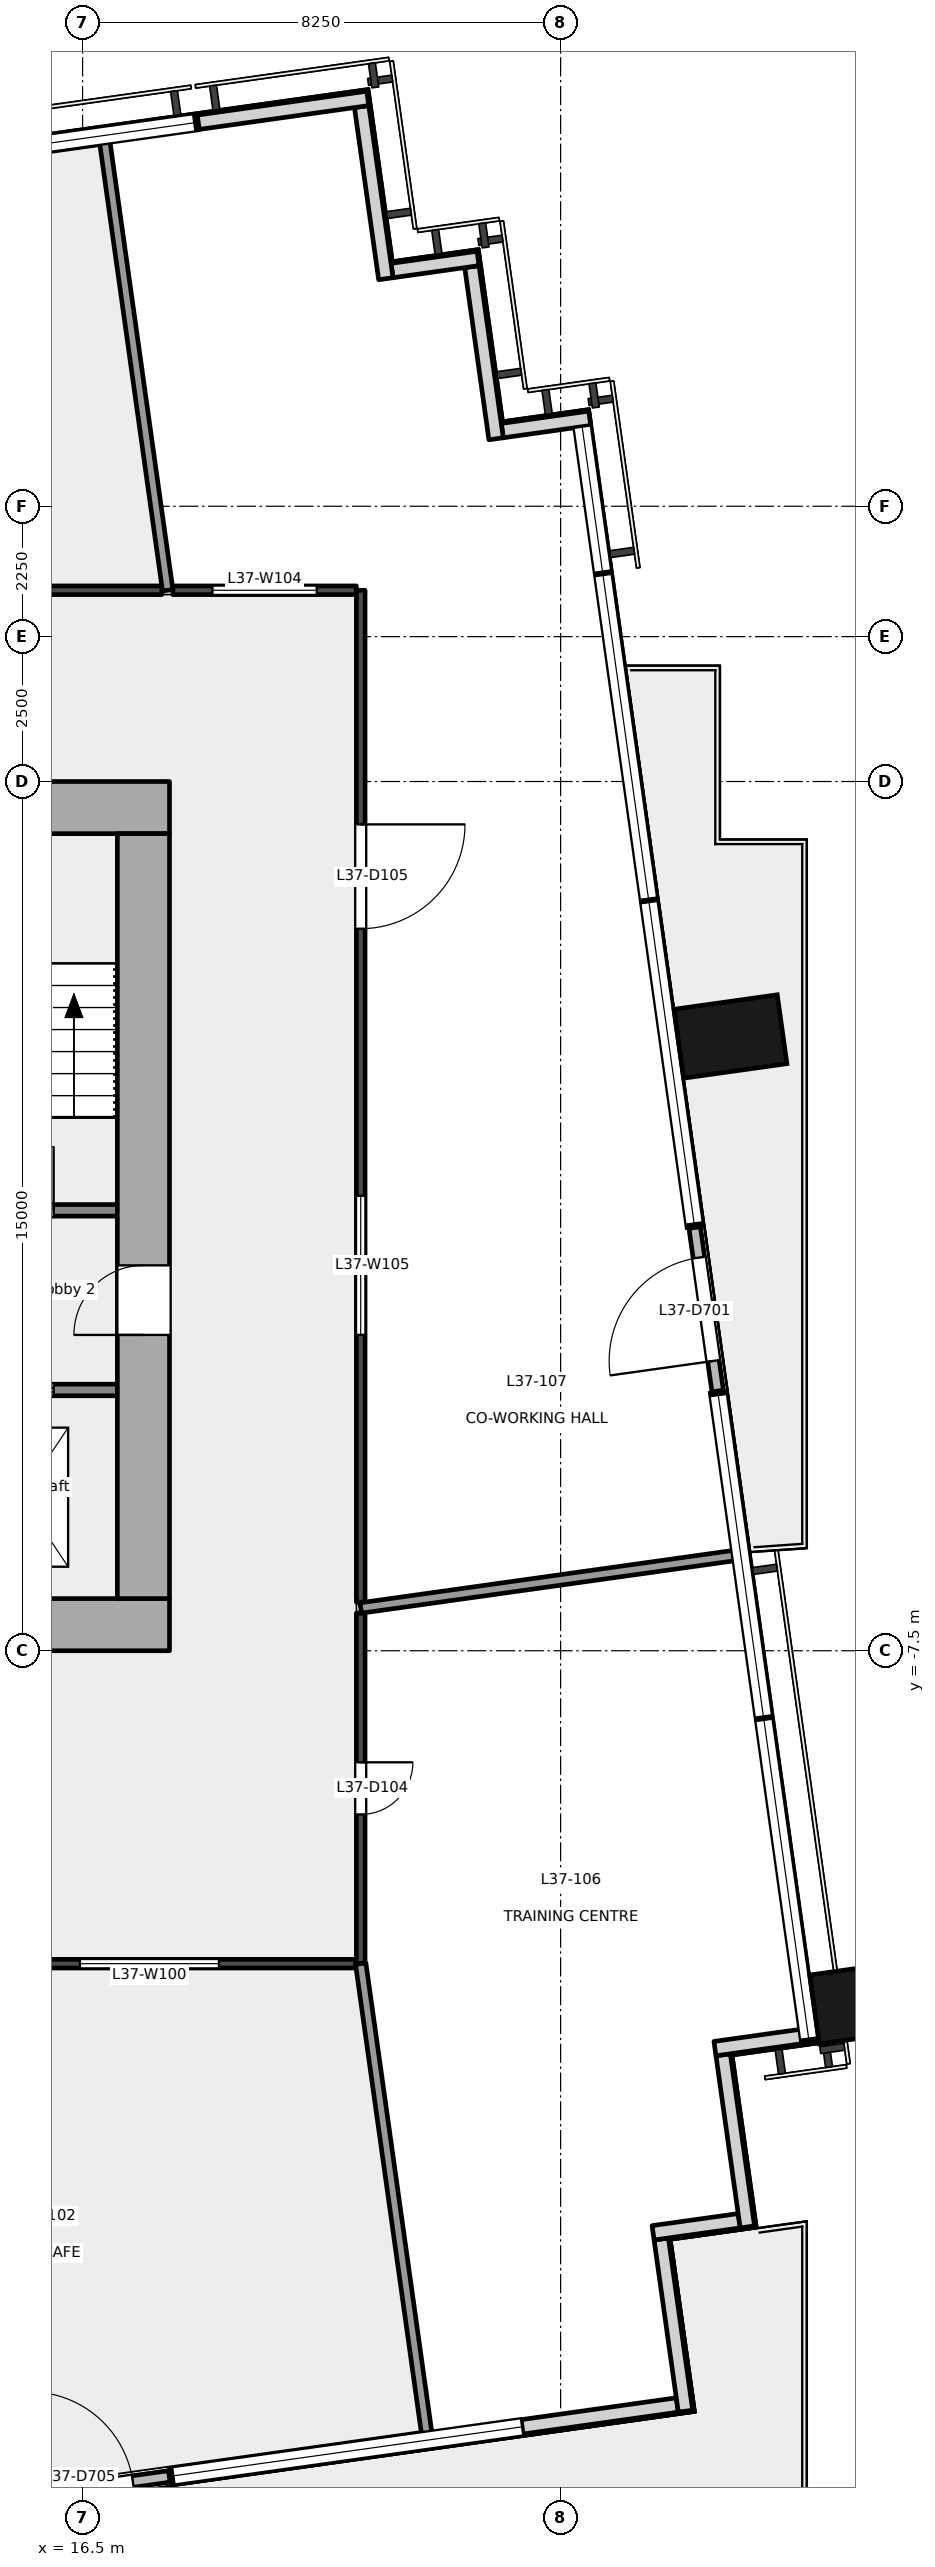
"""IFC4 building model, lengths in metres.
Left out: names, types, materials, properties, quantities, classifications, styles, units other than length and angle.
Written with IfcOpenShell. Run it as: python <this file> out.ifc"""

import sys

from ifc_helpers import new_model, si_unit, direction, frame, frame_2d, origin, origin_2d, place, context, subcontext, project, spatial, rectangle, extrude, element, fill, save


model = new_model("IFC4")
c1 = context("Model", 3, precision=1e-05, world=origin(), true_north=direction((0.0, 1.0)))
c2 = subcontext(c1, "Body", "Model", "MODEL_VIEW")
j1 = project(units=[si_unit("LENGTHUNIT", "METRE"), si_unit("PLANEANGLEUNIT", "RADIAN")], contexts=[c1])
p1 = place(None, origin())
s1 = spatial("IfcSite", under=j1, at=p1, CompositionType="ELEMENT")
p2 = place(p1, origin())
s2 = spatial("IfcBuilding", under=s1, at=p2, CompositionType="ELEMENT")
p3 = place(p2, frame((0.0, 0.0, 163.1)))
s3 = spatial("IfcBuildingStorey", under=s2, at=p3, CompositionType="ELEMENT", Elevation=163.1)
for number, where, z_axis, x_axis in (
    (1, (30.024, -13.565, -0.2), (0.0, 0.0, 1.0), (-0.139, 0.99, 0.0)),
    (2, (27.681, 3.1, -0.2), (0.0, 0.0, 1.0), (-0.139, 0.99, 0.0)),
):
    element("IfcColumn", number, at=place(p3, frame(where, z_axis=z_axis, x_axis=x_axis)), inside=s3, PredefinedType="COLUMN", context=c2, shape_type="SweptSolid", body=[
        extrude(rectangle(XDim=1.2, YDim=1.8, at=origin_2d()), origin(), (0.0, 0.0, 1.0), 5.4),
    ])
p4 = place(p3, frame((24.085, -20.893, 0.0), z_axis=(0.0, 0.0, 1.0), x_axis=(0.990255800966, 0.139260362823, 0.0)))
e3 = element("IfcWall", 3, at=p4, inside=s3, PredefinedType="SOLIDWALL", context=c2, shape_type="SweptSolid", body=[
    extrude(rectangle(XDim=2.705, YDim=0.25, at=frame_2d((1.353, 0.0))), origin(), (0.0, 0.0, 1.0), 5.2),
])
p5 = place(p3, frame((26.905, -20.622, 0.0), z_axis=(0.0, 0.0, 1.0), x_axis=(-0.139313431826, 0.990248336385, 0.0)))
e4 = element("IfcWall", 4, at=p5, inside=s3, PredefinedType="SOLIDWALL", context=c2, shape_type="SweptSolid", body=[
    extrude(rectangle(XDim=3.0, YDim=0.25, at=frame_2d((1.5, 0.0))), origin(), (0.0, 0.0, 1.0), 5.2),
])
p6 = place(p3, frame((26.346, -17.544, 0.0), z_axis=(0.0, 0.0, 1.0), x_axis=(0.990368090482, 0.13845954411, 0.0)))
e5 = element("IfcWall", 5, at=p6, inside=s3, PredefinedType="SOLIDWALL", context=c2, shape_type="SweptSolid", body=[
    extrude(rectangle(XDim=1.5, YDim=0.25, at=frame_2d((0.75, 0.0))), origin(), (0.0, 0.0, 1.0), 5.2),
])
p7 = place(p3, frame((27.973, -17.443, 0.0), z_axis=(0.0, 0.0, 1.0), x_axis=(-0.139313431826, 0.990248336385, 0.0)))
e6 = element("IfcWall", 6, at=p7, inside=s3, PredefinedType="SOLIDWALL", context=c2, shape_type="SweptSolid", body=[
    extrude(rectangle(XDim=3.0, YDim=0.25, at=frame_2d((1.5, 0.0))), origin(), (0.0, 0.0, 1.0), 5.2),
])
p8 = place(p3, frame((27.414, -14.366, 0.0), z_axis=(0.0, 0.0, 1.0), x_axis=(0.990256286673, 0.139256908998, 0.0)))
e7 = element("IfcWall", 7, at=p8, inside=s3, PredefinedType="SOLIDWALL", context=c2, shape_type="SweptSolid", body=[
    extrude(rectangle(XDim=1.801, YDim=0.25, at=frame_2d((0.9, 0.0))), origin(), (0.0, 0.0, 1.0), 5.2),
])
p9 = place(p3, frame((27.461, -3.019, 0.0), z_axis=(0.0, 0.0, 1.0), x_axis=(-0.139202330076, 0.990263960417, 0.0)))
e8 = element("IfcWall", 8, at=p9, inside=s3, PredefinedType="SOLIDWALL", context=c2, shape_type="SweptSolid", body=[
    extrude(rectangle(XDim=2.85, YDim=0.2, at=frame_2d((1.425, 0.0))), origin(), (0.0, 0.0, 1.0), 4.1),
])
p10 = place(p9, frame((0.525, 0.0, 0.0)))
e9 = element("IfcOpeningElement", 9, at=p10, cuts=e8, PredefinedType="OPENING", context=c2, shape_type="SweptSolid", body=[
    extrude(rectangle(XDim=1.8, YDim=2.4, at=frame_2d((0.9, 1.2))), frame((0.0, 0.111, 0.0), z_axis=(0.0, -1.0, 0.0), x_axis=(1.0, 0.0, 0.0)), (0.0, 0.0, 1.0), 0.221),
])
p11 = place(p3, frame((25.253, 13.768, 0.0), z_axis=(0.0, 0.0, 1.0), x_axis=(-0.990248296447, -0.139313715703, 0.0)))
e10 = element("IfcWall", 10, at=p11, inside=s3, PredefinedType="SOLIDWALL", context=c2, shape_type="SweptSolid", body=[
    extrude(rectangle(XDim=1.525, YDim=0.25, at=frame_2d((0.762, 0.0))), origin(), (0.0, 0.0, 1.0), 5.2),
])
p12 = place(p3, frame((23.637, 13.414, 0.0), z_axis=(0.0, 0.0, 1.0), x_axis=(-0.139313431826, 0.990248336385, 0.0)))
e11 = element("IfcWall", 11, at=p12, inside=s3, PredefinedType="SOLIDWALL", context=c2, shape_type="SweptSolid", body=[
    extrude(rectangle(XDim=3.0, YDim=0.25, at=frame_2d((1.5, 0.0))), origin(), (0.0, 0.0, 1.0), 5.2),
])
p13 = place(p3, frame((23.325, 16.526, 0.0), z_axis=(0.0, 0.0, 1.0), x_axis=(-0.990243596651, -0.13934711799, 0.0)))
e12 = element("IfcWall", 12, at=p13, inside=s3, PredefinedType="SOLIDWALL", context=c2, shape_type="SweptSolid", body=[
    extrude(rectangle(XDim=1.5, YDim=0.25, at=frame_2d((0.75, 0.0))), origin(), (0.0, 0.0, 1.0), 5.2),
])
p14 = place(p3, frame((21.734, 16.176, 0.0), z_axis=(0.0, 0.0, 1.0), x_axis=(-0.139313431826, 0.990248336385, 0.0)))
e13 = element("IfcWall", 13, at=p14, inside=s3, PredefinedType="SOLIDWALL", context=c2, shape_type="SweptSolid", body=[
    extrude(rectangle(XDim=3.0, YDim=0.25, at=frame_2d((1.5, 0.0))), origin(), (0.0, 0.0, 1.0), 5.2),
])
p15 = place(p3, frame((21.422, 19.288, 0.0), z_axis=(0.0, 0.0, 1.0), x_axis=(-0.990246427036, -0.139327002919, 0.0)))
e14 = element("IfcWall", 14, at=p15, inside=s3, PredefinedType="SOLIDWALL", context=c2, shape_type="SweptSolid", body=[
    extrude(rectangle(XDim=2.954, YDim=0.25, at=frame_2d((1.477, 0.0))), origin(), (0.0, 0.0, 1.0), 5.2),
])
p16 = place(p3, frame((14.956, -22.176, 0.0), z_axis=(0.0, 0.0, 1.0), x_axis=(0.990275924543, 0.139117192578, 0.0)))
e15 = element("IfcWall", 15, at=p16, inside=s3, PredefinedType="SOLIDWALL", context=c2, shape_type="SweptSolid", body=[
    extrude(rectangle(XDim=3.071, YDim=0.2, at=frame_2d((1.536, 0.0))), origin(), (0.0, 0.0, 1.0), 4.1),
])
p17 = place(p16, frame((0.635, 0.0, 0.0)))
e16 = element("IfcOpeningElement", 16, at=p17, cuts=e15, PredefinedType="OPENING", context=c2, shape_type="SweptSolid", body=[
    extrude(rectangle(XDim=1.8, YDim=2.4, at=frame_2d((0.9, 1.2))), frame((0.0, 0.111, 0.0), z_axis=(0.0, -1.0, 0.0), x_axis=(1.0, 0.0, 0.0)), (0.0, 0.0, 1.0), 0.221),
])
p18 = place(p3, frame((-18.0, -7.05, -0.2), z_axis=(0.0, 0.0, 1.0), x_axis=(1.0, 0.0, 0.0)))
e17 = element("IfcWall", 17, at=p18, inside=s3, PredefinedType="SHEAR", context=c2, shape_type="SweptSolid", body=[
    extrude(rectangle(XDim=36.0, YDim=0.9, at=frame_2d((18.0, 0.0))), origin(), (0.0, 0.0, 1.0), 5.4),
])
p19 = place(p18, frame((7.8, 0.0, 0.2)))
e18 = element("IfcOpeningElement", 18, at=p19, cuts=e17, PredefinedType="OPENING", context=c2, shape_type="SweptSolid", body=[
    extrude(rectangle(XDim=2.4, YDim=2.1, at=frame_2d((1.2, 1.05))), frame((0.0, 0.46, 0.0), z_axis=(0.0, -1.0, 0.0), x_axis=(1.0, 0.0, 0.0)), (0.0, 0.0, 1.0), 0.921),
])
p20 = place(p18, frame((16.8, 0.0, 0.2)))
e19 = element("IfcOpeningElement", 19, at=p20, cuts=e17, PredefinedType="OPENING", context=c2, shape_type="SweptSolid", body=[
    extrude(rectangle(XDim=2.4, YDim=2.1, at=frame_2d((1.2, 1.05))), frame((0.0, 0.46, 0.0), z_axis=(0.0, -1.0, 0.0), x_axis=(1.0, 0.0, 0.0)), (0.0, 0.0, 1.0), 0.921),
])
p21 = place(p18, frame((26.1, 0.0, 0.2)))
e20 = element("IfcOpeningElement", 20, at=p21, cuts=e17, PredefinedType="OPENING", context=c2, shape_type="SweptSolid", body=[
    extrude(rectangle(XDim=2.4, YDim=2.1, at=frame_2d((1.2, 1.05))), frame((0.0, 0.46, 0.0), z_axis=(0.0, -1.0, 0.0), x_axis=(1.0, 0.0, 0.0)), (0.0, 0.0, 1.0), 0.921),
])
p22 = place(p3, frame((-18.0, 7.05, -0.2), z_axis=(0.0, 0.0, 1.0), x_axis=(1.0, 0.0, 0.0)))
e21 = element("IfcWall", 21, at=p22, inside=s3, PredefinedType="SHEAR", context=c2, shape_type="SweptSolid", body=[
    extrude(rectangle(XDim=36.0, YDim=0.9, at=frame_2d((18.0, 0.0))), origin(), (0.0, 0.0, 1.0), 5.4),
])
p23 = place(p3, frame((17.55, -6.6, -0.2), z_axis=(0.0, 0.0, 1.0), x_axis=(0.0, 1.0, 0.0)))
e22 = element("IfcWall", 22, at=p23, inside=s3, PredefinedType="SHEAR", context=c2, shape_type="SweptSolid", body=[
    extrude(rectangle(XDim=13.2, YDim=0.9, at=frame_2d((6.6, 0.0))), origin(), (0.0, 0.0, 1.0), 5.4),
])
p24 = place(p23, frame((4.55, 0.0, 0.2)))
e23 = element("IfcOpeningElement", 23, at=p24, cuts=e22, PredefinedType="OPENING", context=c2, shape_type="SweptSolid", body=[
    extrude(rectangle(XDim=1.2, YDim=2.1, at=frame_2d((0.6, 1.05))), frame((0.0, 0.46, 0.0), z_axis=(0.0, -1.0, 0.0), x_axis=(1.0, 0.0, 0.0)), (0.0, 0.0, 1.0), 0.921),
])
p25 = place(p3, frame((13.8, -3.0, 0.0), z_axis=(0.0, 0.0, 1.0), x_axis=(1.0, 0.0, 0.0)))
e24 = element("IfcWall", 24, at=p25, inside=s3, PredefinedType="PARTITIONING", context=c2, shape_type="SweptSolid", body=[
    extrude(rectangle(XDim=3.3, YDim=0.2, at=frame_2d((1.65, 0.0))), origin(), (0.0, 0.0, 1.0), 5.2),
])
p26 = place(p25, frame((1.1, 0.0, 0.0)))
e25 = element("IfcOpeningElement", 25, at=p26, cuts=e24, PredefinedType="OPENING", context=c2, shape_type="SweptSolid", body=[
    extrude(rectangle(XDim=1.1, YDim=2.1, at=frame_2d((0.55, 1.05))), frame((0.0, 0.111, 0.0), z_axis=(0.0, -1.0, 0.0), x_axis=(1.0, 0.0, 0.0)), (0.0, 0.0, 1.0), 0.221),
])
p27 = place(p3, frame((13.8, 0.1, 0.0), z_axis=(0.0, 0.0, 1.0), x_axis=(1.0, 0.0, 0.0)))
e26 = element("IfcWall", 26, at=p27, inside=s3, PredefinedType="PARTITIONING", context=c2, shape_type="SweptSolid", body=[
    extrude(rectangle(XDim=3.3, YDim=0.2, at=frame_2d((1.65, 0.0))), origin(), (0.0, 0.0, 1.0), 5.2),
])
p28 = place(p27, frame((1.1, 0.0, 0.0)))
e27 = element("IfcOpeningElement", 27, at=p28, cuts=e26, PredefinedType="OPENING", context=c2, shape_type="SweptSolid", body=[
    extrude(rectangle(XDim=1.1, YDim=2.1, at=frame_2d((0.55, 1.05))), frame((0.0, 0.111, 0.0), z_axis=(0.0, -1.0, 0.0), x_axis=(1.0, 0.0, 0.0)), (0.0, 0.0, 1.0), 0.221),
])
p29 = place(p3, frame((21.211, -12.9, 0.0), z_axis=(0.0, 0.0, 1.0), x_axis=(-1.0, 0.0, 0.0)))
e28 = element("IfcWall", 28, at=p29, inside=s3, PredefinedType="PARTITIONING", context=c2, shape_type="SweptSolid", body=[
    extrude(rectangle(XDim=10.555, YDim=0.15, at=frame_2d((5.277, 0.0))), origin(), (0.0, 0.0, 1.0), 4.6),
])
p30 = place(p29, frame((7.116, 0.0, 0.0)))
e29 = element("IfcOpeningElement", 29, at=p30, cuts=e28, PredefinedType="OPENING", context=c2, shape_type="SweptSolid", body=[
    extrude(rectangle(XDim=0.9, YDim=2.1, at=frame_2d((0.45, 1.05))), frame((0.0, 0.085, 0.0), z_axis=(0.0, -1.0, 0.0), x_axis=(1.0, 0.0, 0.0)), (0.0, 0.0, 1.0), 0.171),
])
p31 = place(p29, frame((2.358, 0.0, 0.0)))
e30 = element("IfcOpeningElement", 30, at=p31, cuts=e28, PredefinedType="OPENING", context=c2, shape_type="SweptSolid", body=[
    extrude(rectangle(XDim=2.4, YDim=2.4, at=frame_2d((1.2, 1.2))), frame((0.0, 0.085, 0.0), z_axis=(0.0, -1.0, 0.0), x_axis=(1.0, 0.0, 0.0)), (0.0, 0.0, 1.0), 0.171),
])
p32 = place(p3, frame((7.246, 10.8, 0.0), z_axis=(0.0, 0.0, 1.0), x_axis=(1.0, 0.0, 0.0)))
e31 = element("IfcWall", 31, at=p32, inside=s3, PredefinedType="PARTITIONING", context=c2, shape_type="SweptSolid", body=[
    extrude(rectangle(XDim=10.622, YDim=0.15, at=frame_2d((5.311, 0.0))), origin(), (0.0, 0.0, 1.0), 4.7),
])
p33 = place(p32, frame((7.166, 0.0, 0.0)))
e32 = element("IfcOpeningElement", 32, at=p33, cuts=e31, PredefinedType="OPENING", context=c2, shape_type="SweptSolid", body=[
    extrude(rectangle(XDim=0.9, YDim=2.1, at=frame_2d((0.45, 1.05))), frame((0.0, 0.085, 0.0), z_axis=(0.0, -1.0, 0.0), x_axis=(1.0, 0.0, 0.0)), (0.0, 0.0, 1.0), 0.171),
])
p34 = place(p32, frame((2.383, 0.0, 0.0)))
e33 = element("IfcOpeningElement", 33, at=p34, cuts=e31, PredefinedType="OPENING", context=c2, shape_type="SweptSolid", body=[
    extrude(rectangle(XDim=2.4, YDim=2.4, at=frame_2d((1.2, 1.2))), frame((0.0, 0.085, 0.0), z_axis=(0.0, -1.0, 0.0), x_axis=(1.0, 0.0, 0.0)), (0.0, 0.0, 1.0), 0.171),
])
p35 = place(p3, frame((21.3, -6.851, 0.0), z_axis=(0.0, 0.0, 1.0), x_axis=(0.0, -1.0, 0.0)))
e34 = element("IfcWall", 34, at=p35, inside=s3, PredefinedType="PARTITIONING", context=c2, shape_type="SweptSolid", body=[
    extrude(rectangle(XDim=6.049, YDim=0.15, at=frame_2d((3.024, 0.0))), origin(), (0.0, 0.0, 1.0), 5.2),
])
p36 = place(p35, frame((2.574, 0.0, 0.0)))
e35 = element("IfcOpeningElement", 35, at=p36, cuts=e34, PredefinedType="OPENING", context=c2, shape_type="SweptSolid", body=[
    extrude(rectangle(XDim=0.9, YDim=2.1, at=frame_2d((0.45, 1.05))), frame((0.0, 0.085, 0.0), z_axis=(0.0, -1.0, 0.0), x_axis=(1.0, 0.0, 0.0)), (0.0, 0.0, 1.0), 0.171),
])
p37 = place(p3, frame((18.058, 10.8, 0.0), z_axis=(0.0, 0.0, 1.0), x_axis=(1.0, 0.0, 0.0)))
e36 = element("IfcWall", 36, at=p37, inside=s3, PredefinedType="PARTITIONING", context=c2, shape_type="SweptSolid", body=[
    extrude(rectangle(XDim=3.167, YDim=0.15, at=frame_2d((1.583, 0.0))), origin(), (0.0, 0.0, 1.0), 5.2),
])
p38 = place(p37, frame((0.683, 0.0, 0.0)))
e37 = element("IfcOpeningElement", 37, at=p38, cuts=e36, PredefinedType="OPENING", context=c2, shape_type="SweptSolid", body=[
    extrude(rectangle(XDim=1.8, YDim=2.4, at=frame_2d((0.9, 1.2))), frame((0.0, 0.085, 0.0), z_axis=(0.0, -1.0, 0.0), x_axis=(1.0, 0.0, 0.0)), (0.0, 0.0, 1.0), 0.171),
])
p39 = place(p3, frame((21.3, 10.8, 0.0), z_axis=(0.0, 0.0, 1.0), x_axis=(0.0, -1.0, 0.0)))
e38 = element("IfcWall", 38, at=p39, inside=s3, PredefinedType="PARTITIONING", context=c2, shape_type="SweptSolid", body=[
    extrude(rectangle(XDim=17.461, YDim=0.15, at=frame_2d((8.73, 0.0))), origin(), (0.0, 0.0, 1.0), 4.75),
])
p40 = place(p39, frame((4.04, 0.0, 0.0)))
e39 = element("IfcOpeningElement", 39, at=p40, cuts=e38, PredefinedType="OPENING", context=c2, shape_type="SweptSolid", body=[
    extrude(rectangle(XDim=1.8, YDim=2.1, at=frame_2d((0.9, 1.05))), frame((0.0, 0.085, 0.0), z_axis=(0.0, -1.0, 0.0), x_axis=(1.0, 0.0, 0.0)), (0.0, 0.0, 1.0), 0.171),
])
p41 = place(p39, frame((10.449, 0.0, 0.0)))
e40 = element("IfcOpeningElement", 40, at=p41, cuts=e38, PredefinedType="OPENING", context=c2, shape_type="SweptSolid", body=[
    extrude(rectangle(XDim=2.4, YDim=2.4, at=frame_2d((1.2, 1.2))), frame((0.0, 0.085, 0.0), z_axis=(0.0, -1.0, 0.0), x_axis=(1.0, 0.0, 0.0)), (0.0, 0.0, 1.0), 0.171),
])
p42 = place(p3, frame((21.3, -12.9, 0.0), z_axis=(0.0, 0.0, 1.0), x_axis=(0.13917785753, -0.990267400238, 0.0)))
e41 = element("IfcWall", 41, at=p42, inside=s3, PredefinedType="PARTITIONING", context=c2, shape_type="SweptSolid", body=[
    extrude(rectangle(XDim=8.213, YDim=0.18, at=frame_2d((4.106, 0.0))), origin(), (0.0, 0.0, 1.0), 5.2),
])
p43 = place(p3, frame((16.879, 18.559, 0.0), z_axis=(0.0, 0.0, 1.0), x_axis=(0.139126403365, -0.990274630538, 0.0)))
e42 = element("IfcWall", 42, at=p43, inside=s3, PredefinedType="PARTITIONING", context=c2, shape_type="SweptSolid", body=[
    extrude(rectangle(XDim=7.835, YDim=0.18, at=frame_2d((3.917, 0.0))), origin(), (0.0, 0.0, 1.0), 5.2),
])
p44 = place(p3, frame((21.3, -6.762, 0.0), z_axis=(0.0, 0.0, 1.0), x_axis=(0.990293345408, 0.13899312947, 0.0)))
e43 = element("IfcWall", 43, at=p44, inside=s3, PredefinedType="PARTITIONING", context=c2, shape_type="SweptSolid", body=[
    extrude(rectangle(XDim=6.532, YDim=0.18, at=frame_2d((3.266, 0.0))), origin(), (0.0, 0.0, 1.0), 5.2),
])
p45 = place(p10, origin())
e44 = element("IfcDoor", 44, at=p45, inside=s3, OperationType="DOUBLE_DOOR_SINGLE_SWING", PredefinedType="DOOR", context=c2, shape_type="SweptSolid", body=[
    extrude(rectangle(XDim=1.8, YDim=2.4, at=frame_2d((0.9, 1.2))), frame((0.0, 0.025, 0.0), z_axis=(0.0, -1.0, 0.0), x_axis=(1.0, 0.0, 0.0)), (0.0, 0.0, 1.0), 0.05),
])
fill(e9, e44)
p46 = place(p17, origin())
e45 = element("IfcDoor", 45, at=p46, inside=s3, OperationType="DOUBLE_DOOR_SINGLE_SWING", PredefinedType="DOOR", context=c2, shape_type="SweptSolid", body=[
    extrude(rectangle(XDim=1.8, YDim=2.4, at=frame_2d((0.9, 1.2))), frame((0.0, 0.025, 0.0), z_axis=(0.0, -1.0, 0.0), x_axis=(1.0, 0.0, 0.0)), (0.0, 0.0, 1.0), 0.05),
])
fill(e16, e45)
p47 = place(p26, origin())
e46 = element("IfcDoor", 46, at=p47, inside=s3, OperationType="DOUBLE_DOOR_SLIDING", PredefinedType="DOOR", context=c2, shape_type="SweptSolid", body=[
    extrude(rectangle(XDim=1.1, YDim=2.1, at=frame_2d((0.55, 1.05))), frame((0.0, 0.025, 0.0), z_axis=(0.0, -1.0, 0.0), x_axis=(1.0, 0.0, 0.0)), (0.0, 0.0, 1.0), 0.05),
])
fill(e25, e46)
p48 = place(p24, origin())
e47 = element("IfcDoor", 47, at=p48, inside=s3, OperationType="SINGLE_SWING_LEFT", PredefinedType="DOOR", context=c2, shape_type="SweptSolid", body=[
    extrude(rectangle(XDim=1.2, YDim=2.1, at=frame_2d((0.6, 1.05))), frame((0.0, 0.025, 0.0), z_axis=(0.0, -1.0, 0.0), x_axis=(1.0, 0.0, 0.0)), (0.0, 0.0, 1.0), 0.05),
])
fill(e23, e47)
p49 = place(p28, origin())
e48 = element("IfcDoor", 48, at=p49, inside=s3, OperationType="SINGLE_SWING_RIGHT", PredefinedType="DOOR", context=c2, shape_type="SweptSolid", body=[
    extrude(rectangle(XDim=1.1, YDim=2.1, at=frame_2d((0.55, 1.05))), frame((0.0, 0.025, 0.0), z_axis=(0.0, -1.0, 0.0), x_axis=(1.0, 0.0, 0.0)), (0.0, 0.0, 1.0), 0.05),
])
fill(e27, e48)
p50 = place(p36, origin())
e49 = element("IfcDoor", 49, at=p50, inside=s3, OperationType="SINGLE_SWING_LEFT", PredefinedType="DOOR", context=c2, shape_type="SweptSolid", body=[
    extrude(rectangle(XDim=0.9, YDim=2.1, at=frame_2d((0.45, 1.05))), frame((0.0, 0.025, 0.0), z_axis=(0.0, -1.0, 0.0), x_axis=(1.0, 0.0, 0.0)), (0.0, 0.0, 1.0), 0.05),
])
fill(e35, e49)
p51 = place(p40, origin())
e50 = element("IfcDoor", 50, at=p51, inside=s3, OperationType="DOUBLE_DOOR_SINGLE_SWING", PredefinedType="DOOR", context=c2, shape_type="SweptSolid", body=[
    extrude(rectangle(XDim=1.8, YDim=2.1, at=frame_2d((0.9, 1.05))), frame((0.0, 0.025, 0.0), z_axis=(0.0, -1.0, 0.0), x_axis=(1.0, 0.0, 0.0)), (0.0, 0.0, 1.0), 0.05),
])
fill(e39, e50)
p52 = place(p31, origin())
e51 = element("IfcWindow", 51, at=p52, inside=s3, PartitioningType="SINGLE_PANEL", PredefinedType="WINDOW", context=c2, shape_type="SweptSolid", body=[
    extrude(rectangle(XDim=2.4, YDim=2.4, at=frame_2d((1.2, 1.2))), frame((0.0, 0.03, 0.0), z_axis=(0.0, -1.0, 0.0), x_axis=(1.0, 0.0, 0.0)), (0.0, 0.0, 1.0), 0.06),
])
fill(e30, e51)
p53 = place(p38, origin())
e52 = element("IfcWindow", 52, at=p53, inside=s3, PartitioningType="SINGLE_PANEL", PredefinedType="WINDOW", context=c2, shape_type="SweptSolid", body=[
    extrude(rectangle(XDim=1.8, YDim=2.4, at=frame_2d((0.9, 1.2))), frame((0.0, 0.03, 0.0), z_axis=(0.0, -1.0, 0.0), x_axis=(1.0, 0.0, 0.0)), (0.0, 0.0, 1.0), 0.06),
])
fill(e37, e52)
p54 = place(p41, origin())
e53 = element("IfcWindow", 53, at=p54, inside=s3, PartitioningType="SINGLE_PANEL", PredefinedType="WINDOW", context=c2, shape_type="SweptSolid", body=[
    extrude(rectangle(XDim=2.4, YDim=2.4, at=frame_2d((1.2, 1.2))), frame((0.0, 0.03, 0.0), z_axis=(0.0, -1.0, 0.0), x_axis=(1.0, 0.0, 0.0)), (0.0, 0.0, 1.0), 0.06),
])
fill(e40, e53)
save(model, sys.argv[1])
